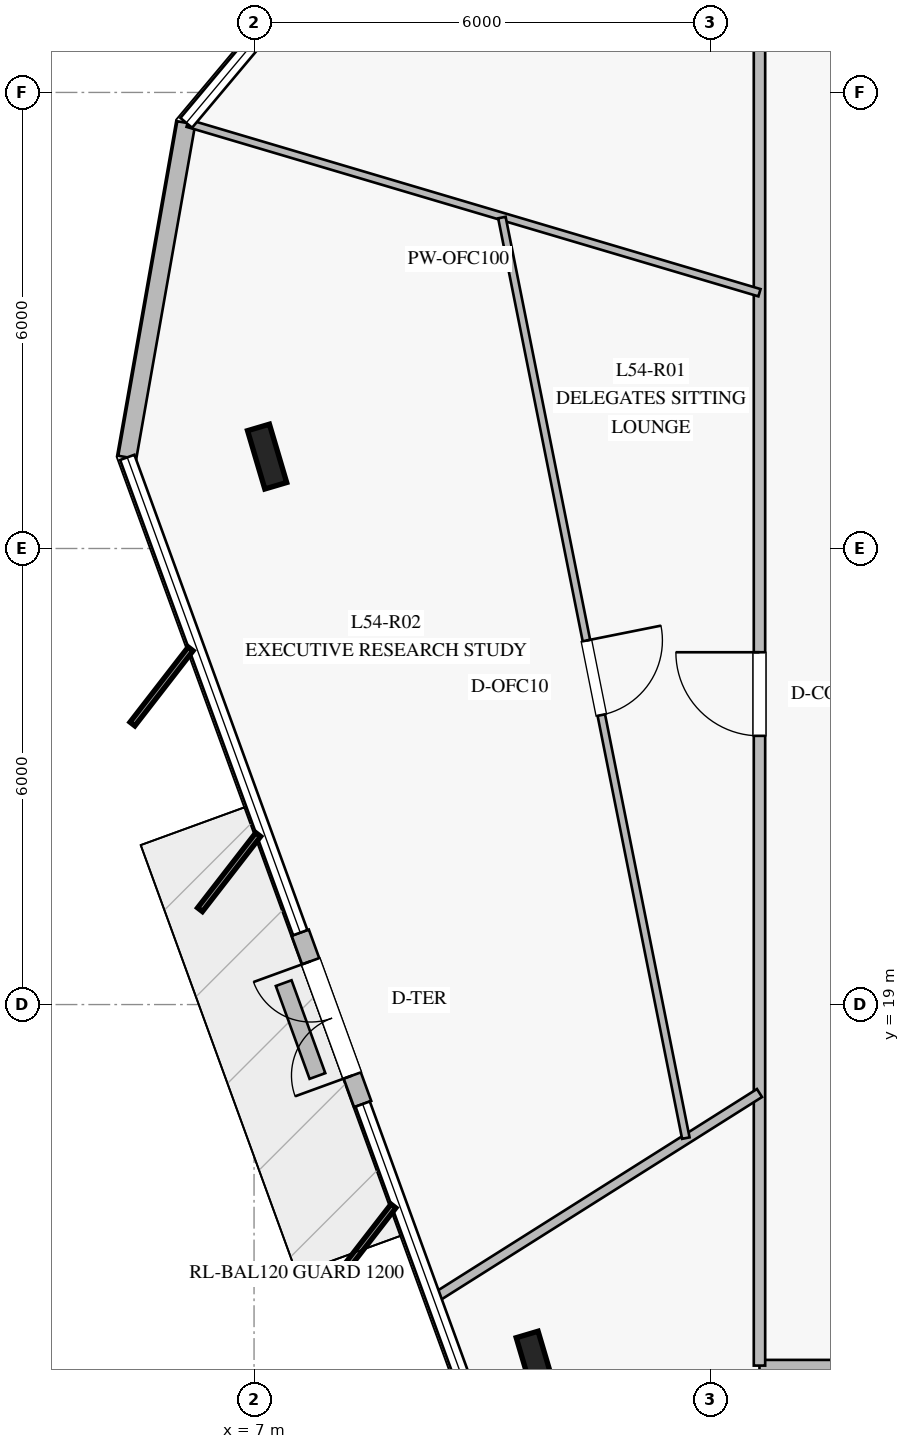
"""IFC4 building model, lengths in metres.
Left out: names, types, materials, properties, quantities, classifications, styles, units other than length and angle.
Written with IfcOpenShell. Run it as: python <this file> out.ifc"""

import sys

from ifc_helpers import new_model, si_unit, direction, frame, frame_2d, origin, origin_2d, place, context, subcontext, project, spatial, rectangle, i_section, extrude, element, fill, save


model = new_model("IFC4")
c1 = context("Model", 3, precision=1e-05, world=origin(), true_north=direction((0.0, 1.0)))
c2 = subcontext(c1, "Body", "Model", "MODEL_VIEW")
j1 = project(units=[si_unit("LENGTHUNIT", "METRE"), si_unit("PLANEANGLEUNIT", "RADIAN")], contexts=[c1])
p1 = place(None, origin())
s1 = spatial("IfcSite", under=j1, at=p1, CompositionType="ELEMENT")
p2 = place(p1, origin())
s2 = spatial("IfcBuilding", under=s1, at=p2, CompositionType="ELEMENT")
p3 = place(p2, frame((0.0, 0.0, 224.8)))
s3 = spatial("IfcBuildingStorey", under=s2, at=p3, CompositionType="ELEMENT", Elevation=224.8)
for number, where, z_axis, x_axis in (
    (1, (7.172, 26.209, 0.0), (0.0, 0.0, 1.0), (-0.284, 0.959, 0.0)),
    (2, (10.707, 14.276, 0.0), (0.0, 0.0, 1.0), (-0.284, 0.959, 0.0)),
):
    element("IfcColumn", number, at=place(p3, frame(where, z_axis=z_axis, x_axis=x_axis)), inside=s3, PredefinedType="COLUMN", context=c2, shape_type="SweptSolid", body=[
        extrude(i_section(OverallWidth=0.3, OverallDepth=0.8, WebThickness=0.018, FlangeThickness=0.033, at=origin_2d()), origin(), (0.0, 0.0, 1.0), 4.0),
    ])
p4 = place(p3, frame((6.108, 30.6, 0.0), z_axis=(0.0, 0.0, 1.0), x_axis=(-0.173613925281, -0.984813792018, 0.0)))
e3 = element("IfcWall", 3, at=p4, inside=s3, PredefinedType="STANDARD", context=c2, shape_type="SweptSolid", body=[
    extrude(rectangle(XDim=4.469, YDim=0.24, at=frame_2d((2.234, 0.0))), origin(), (0.0, 0.0, 1.0), 3.78),
])
p5 = place(p3, frame((7.608, 19.946, 0.0), z_axis=(0.0, 0.0, 1.0), x_axis=(0.342110593602, -0.939659694648, 0.0)))
e4 = element("IfcWall", 4, at=p5, inside=s3, PredefinedType="STANDARD", context=c2, shape_type="SweptSolid", body=[
    extrude(rectangle(XDim=2.4, YDim=0.24, at=frame_2d((1.2, 0.0))), origin(), (0.0, 0.0, 1.0), 3.78),
])
p6 = place(p5, frame((0.4, 0.0, 0.0)))
e5 = element("IfcOpeningElement", 5, at=p6, cuts=e4, PredefinedType="OPENING", context=c2, shape_type="SweptSolid", body=[
    extrude(rectangle(XDim=1.6, YDim=2.25, at=frame_2d((0.8, 1.125))), frame((0.0, 0.13, 0.0), z_axis=(0.0, -1.0, 0.0), x_axis=(1.0, 0.0, 0.0)), (0.0, 0.0, 1.0), 0.26),
])
p7 = place(p3, frame((7.39, 19.282, 0.0), z_axis=(0.0, 0.0, 1.0), x_axis=(0.341577205661, -0.93985371871, 0.0)))
e6 = element("IfcWall", 6, at=p7, inside=s3, PredefinedType="USERDEFINED", context=c2, shape_type="SweptSolid", body=[
    extrude(rectangle(XDim=1.3, YDim=0.22, at=frame_2d((0.65, 0.0))), origin(), (0.0, 0.0, 1.0), 0.4),
])
p8 = place(p3, frame((36.35, 14.25, 0.0), z_axis=(0.0, 0.0, 1.0), x_axis=(-1.0, 0.0, 0.0)))
e7 = element("IfcWall", 7, at=p8, inside=s3, PredefinedType="PARTITIONING", context=c2, shape_type="SweptSolid", body=[
    extrude(rectangle(XDim=22.7, YDim=0.15, at=frame_2d((11.35, 0.0))), origin(), (0.0, 0.0, 1.0), 3.05),
])
p9 = place(p8, frame((16.456, 0.0, 0.0)))
e8 = element("IfcOpeningElement", 8, at=p9, cuts=e7, PredefinedType="OPENING", context=c2, shape_type="SweptSolid", body=[
    extrude(rectangle(XDim=1.1, YDim=2.2, at=frame_2d((0.55, 1.1))), frame((0.0, 0.085, 0.0), z_axis=(0.0, -1.0, 0.0), x_axis=(1.0, 0.0, 0.0)), (0.0, 0.0, 1.0), 0.17),
])
p10 = place(p3, frame((13.65, 14.25, 0.0), z_axis=(0.0, 0.0, 1.0), x_axis=(0.0, 1.0, 0.0)))
e9 = element("IfcWall", 9, at=p10, inside=s3, PredefinedType="PARTITIONING", context=c2, shape_type="SweptSolid", body=[
    extrude(rectangle(XDim=21.5, YDim=0.15, at=frame_2d((10.75, 0.0))), origin(), (0.0, 0.0, 1.0), 3.28),
])
p11 = place(p10, frame((8.285, 0.0, 0.0)))
e10 = element("IfcOpeningElement", 10, at=p11, cuts=e9, PredefinedType="OPENING", context=c2, shape_type="SweptSolid", body=[
    extrude(rectangle(XDim=1.1, YDim=2.2, at=frame_2d((0.55, 1.1))), frame((0.0, 0.085, 0.0), z_axis=(0.0, -1.0, 0.0), x_axis=(1.0, 0.0, 0.0)), (0.0, 0.0, 1.0), 0.17),
])
p12 = place(p3, frame((13.65, 28.365, 0.0), z_axis=(0.0, 0.0, 1.0), x_axis=(-0.958774884237, 0.284166714018, 0.0)))
e11 = element("IfcWall", 11, at=p12, inside=s3, PredefinedType="MOVABLE", context=c2, shape_type="SweptSolid", body=[
    extrude(rectangle(XDim=7.847, YDim=0.1, at=frame_2d((3.924, 0.0))), origin(), (0.0, 0.0, 1.0), 3.18),
])
p13 = place(p3, frame((13.65, 17.836, 0.0), z_axis=(0.0, 0.0, 1.0), x_axis=(-0.845607107165, -0.533805788946, 0.0)))
e12 = element("IfcWall", 12, at=p13, inside=s3, PredefinedType="PARTITIONING", context=c2, shape_type="SweptSolid", body=[
    extrude(rectangle(XDim=5.054, YDim=0.125, at=frame_2d((2.527, 0.0))), origin(), (0.0, 0.0, 1.0), 3.18),
])
p14 = place(p3, frame((10.261, 29.354, 0.0), z_axis=(0.0, 0.0, 1.0), x_axis=(0.195937462268, -0.980616393336, 0.0)))
e13 = element("IfcWall", 13, at=p14, inside=s3, PredefinedType="MOVABLE", context=c2, shape_type="SweptSolid", body=[
    extrude(rectangle(XDim=12.351, YDim=0.1, at=frame_2d((6.175, 0.0))), origin(), (0.0, 0.0, 1.0), 3.28),
])
p15 = place(p14, frame((5.675, 0.0, 0.0)))
e14 = element("IfcOpeningElement", 14, at=p15, cuts=e13, PredefinedType="OPENING", context=c2, shape_type="SweptSolid", body=[
    extrude(rectangle(XDim=1.0, YDim=2.15, at=frame_2d((0.5, 1.075))), frame((0.0, 0.06, 0.0), z_axis=(0.0, -1.0, 0.0), x_axis=(1.0, 0.0, 0.0)), (0.0, 0.0, 1.0), 0.12),
])
p16 = place(p6, frame((1.6, 0.0, 0.0), z_axis=(0.0, 0.0, 1.0), x_axis=(-1.0, 0.0, 0.0)))
e15 = element("IfcDoor", 15, at=p16, inside=s3, OperationType="DOUBLE_DOOR_SINGLE_SWING", PredefinedType="DOOR", context=c2, shape_type="SweptSolid", body=[
    extrude(rectangle(XDim=1.6, YDim=2.25, at=frame_2d((0.8, 1.125))), frame((0.0, 0.025, 0.0), z_axis=(0.0, -1.0, 0.0), x_axis=(1.0, 0.0, 0.0)), (0.0, 0.0, 1.0), 0.05),
])
fill(e5, e15)
p17 = place(p11, origin())
e16 = element("IfcDoor", 16, at=p17, inside=s3, OperationType="SINGLE_SWING_RIGHT", PredefinedType="DOOR", context=c2, shape_type="SweptSolid", body=[
    extrude(rectangle(XDim=1.1, YDim=2.2, at=frame_2d((0.55, 1.1))), frame((0.0, 0.025, 0.0), z_axis=(0.0, -1.0, 0.0), x_axis=(1.0, 0.0, 0.0)), (0.0, 0.0, 1.0), 0.05),
])
fill(e10, e16)
p18 = place(p15, origin())
e17 = element("IfcDoor", 17, at=p18, inside=s3, OperationType="SINGLE_SWING_LEFT", PredefinedType="DOOR", context=c2, shape_type="SweptSolid", body=[
    extrude(rectangle(XDim=1.0, YDim=2.15, at=frame_2d((0.5, 1.075))), frame((0.0, 0.025, 0.0), z_axis=(0.0, -1.0, 0.0), x_axis=(1.0, 0.0, 0.0)), (0.0, 0.0, 1.0), 0.05),
])
fill(e14, e17)
save(model, sys.argv[1])
